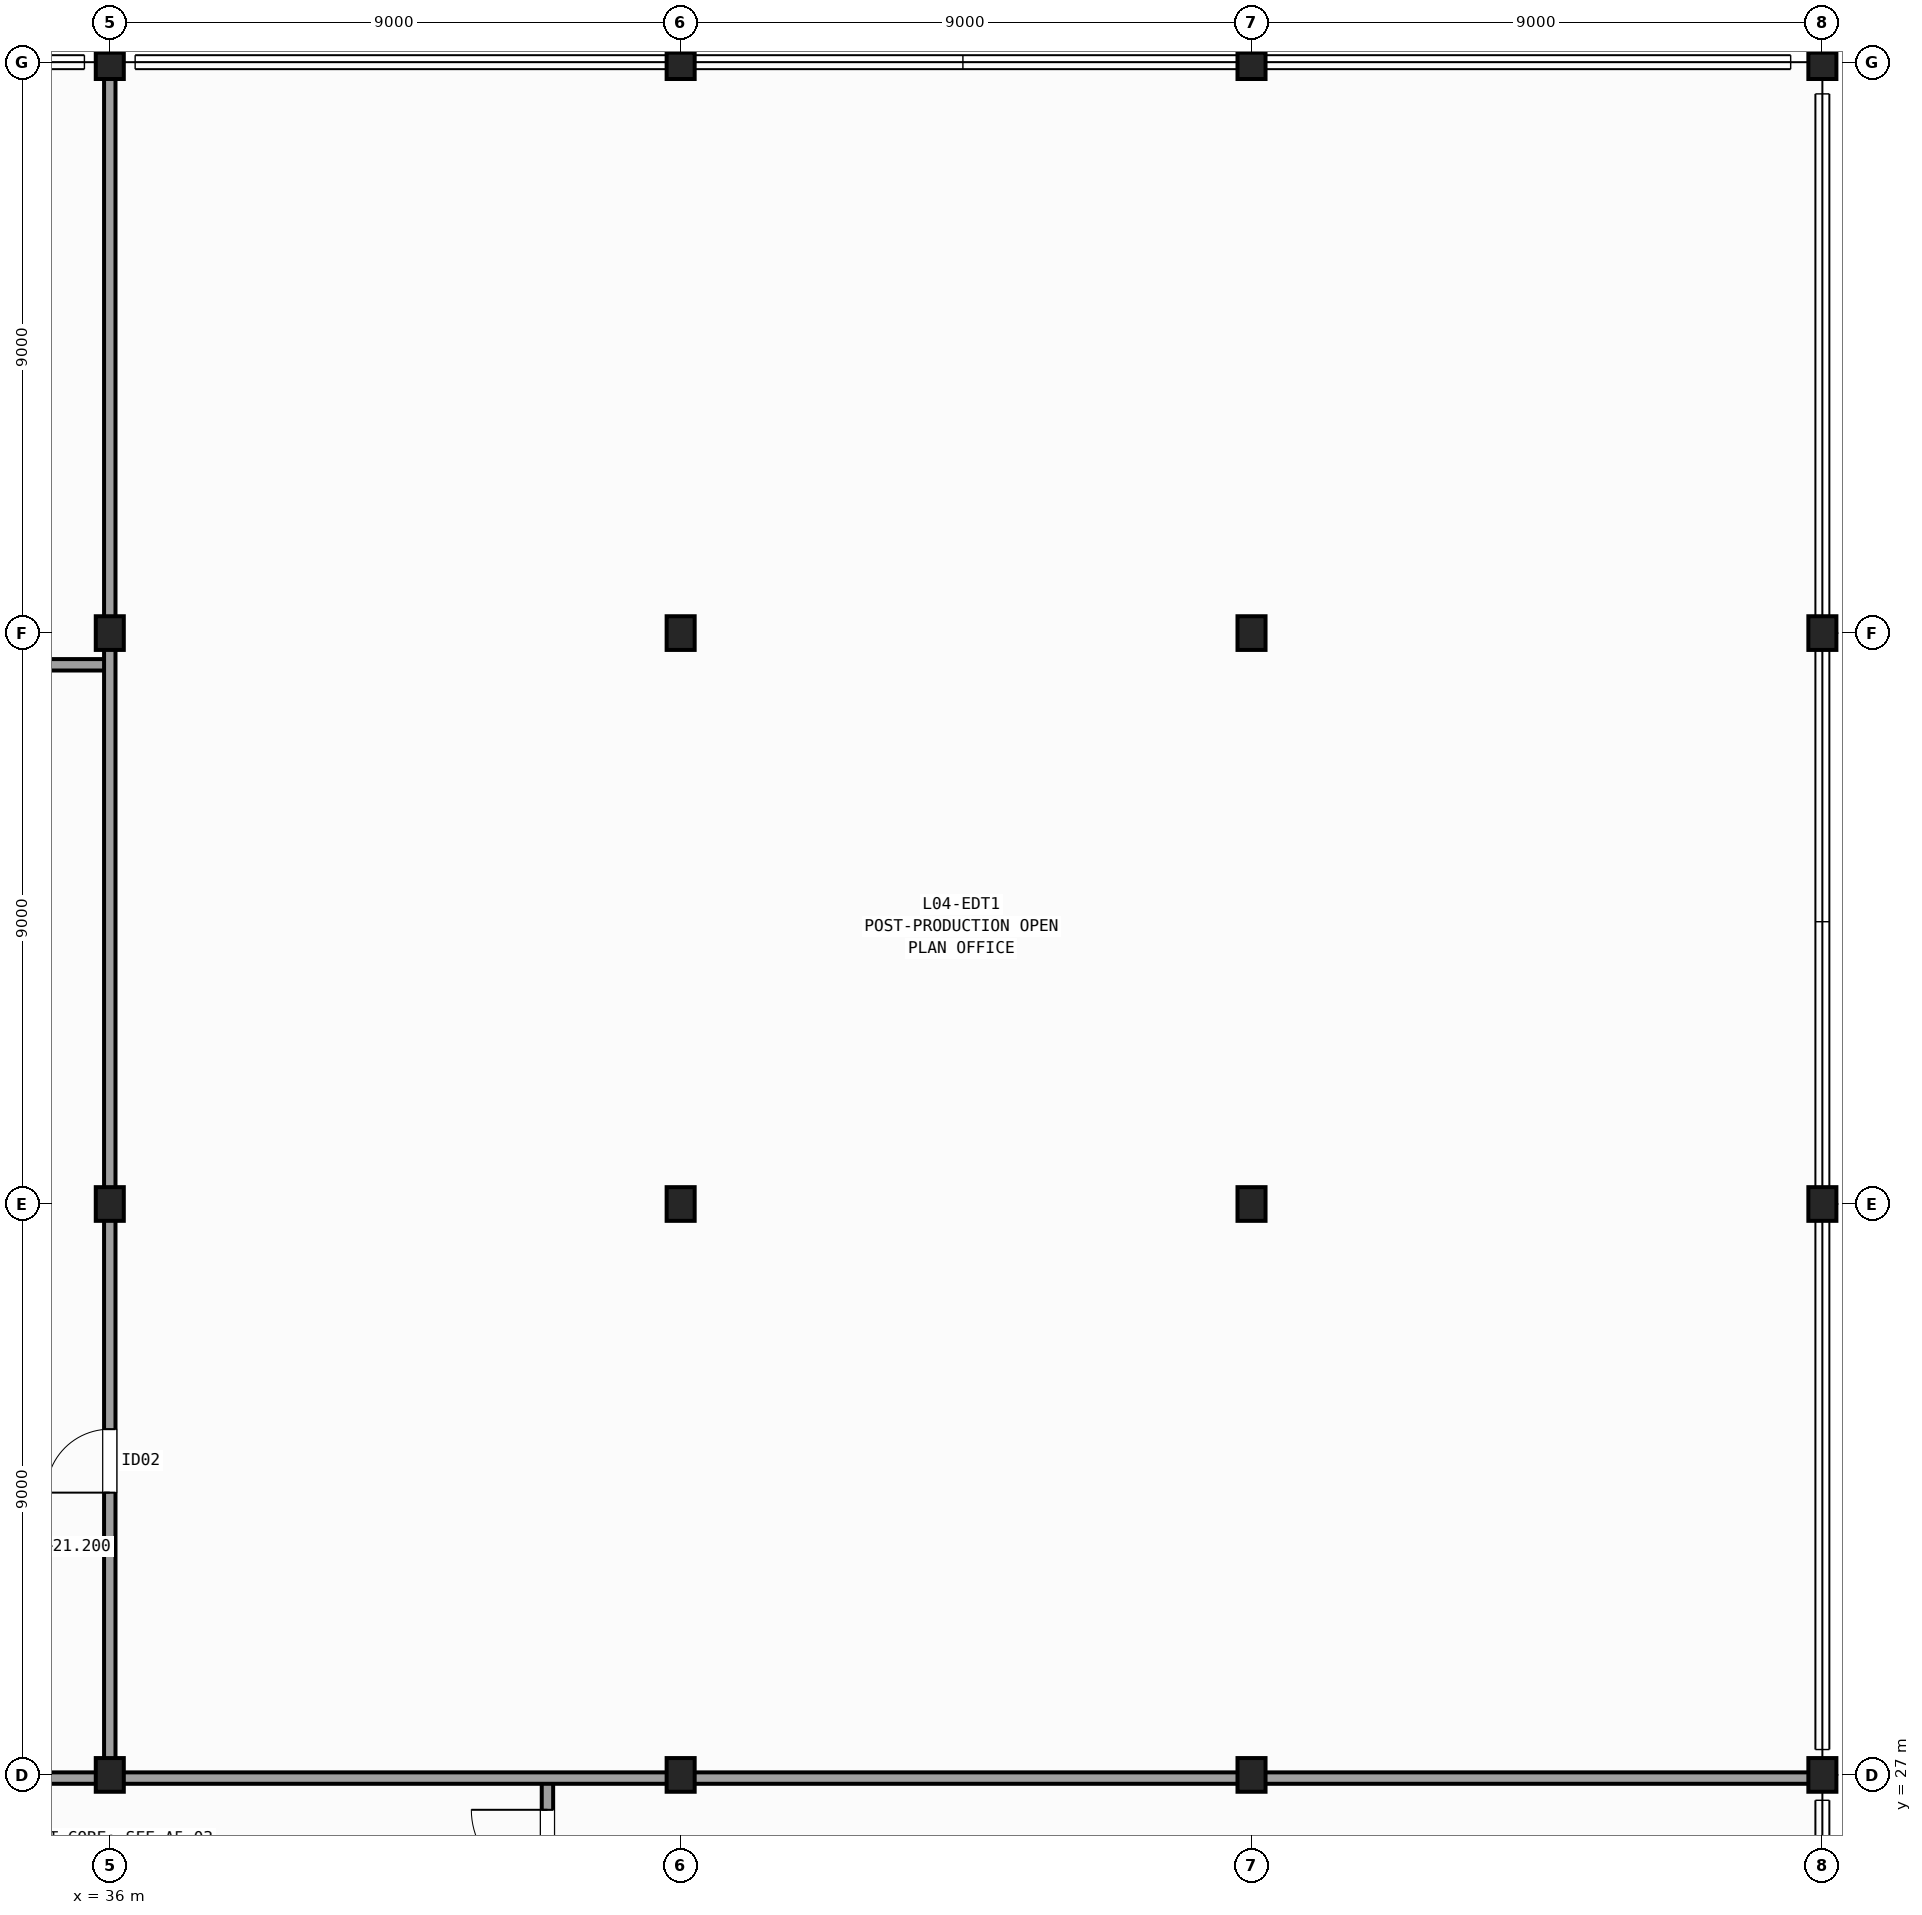
"""IFC4 building model, lengths in metres.
Left out: names, types, materials, properties, quantities, classifications, styles, units other than length and angle.
Written with IfcOpenShell. Run it as: python <this file> out.ifc"""

import sys

from ifc_helpers import new_model, si_unit, direction, frame, frame_2d, origin, origin_2d, place, context, subcontext, project, spatial, rectangle, i_section, extrude, element, fill, save


model = new_model("IFC4")
c1 = context("Model", 3, precision=1e-05, world=origin(), true_north=direction((0.0, 1.0)))
c2 = subcontext(c1, "Body", "Model", "MODEL_VIEW")
j1 = project(units=[si_unit("LENGTHUNIT", "METRE"), si_unit("PLANEANGLEUNIT", "RADIAN")], contexts=[c1])
p1 = place(None, origin())
s1 = spatial("IfcSite", under=j1, at=p1, CompositionType="ELEMENT")
p2 = place(p1, origin())
s2 = spatial("IfcBuilding", under=s1, at=p2, CompositionType="ELEMENT")
p3 = place(p2, frame((0.0, 0.0, 21.2)))
s3 = spatial("IfcBuildingStorey", under=s2, at=p3, CompositionType="ELEMENT", Elevation=21.2)
for number, where, z_axis, x_axis in (
    (1, (36.0, 27.0, 0.0), (0.0, 0.0, 1.0), (1.0, 0.0, 0.0)),
    (2, (36.0, 36.0, 0.0), (0.0, 0.0, 1.0), (1.0, 0.0, 0.0)),
    (3, (36.0, 45.0, 0.0), (0.0, 0.0, 1.0), (1.0, 0.0, 0.0)),
    (4, (36.0, 54.0, 0.0), (0.0, 0.0, 1.0), (1.0, 0.0, 0.0)),
    (5, (45.0, 27.0, 0.0), (0.0, 0.0, 1.0), (1.0, 0.0, 0.0)),
    (6, (45.0, 36.0, 0.0), (0.0, 0.0, 1.0), (1.0, 0.0, 0.0)),
    (7, (45.0, 45.0, 0.0), (0.0, 0.0, 1.0), (1.0, 0.0, 0.0)),
    (8, (45.0, 54.0, 0.0), (0.0, 0.0, 1.0), (1.0, 0.0, 0.0)),
    (9, (54.0, 27.0, 0.0), (0.0, 0.0, 1.0), (1.0, 0.0, 0.0)),
    (10, (54.0, 36.0, 0.0), (0.0, 0.0, 1.0), (1.0, 0.0, 0.0)),
    (11, (54.0, 45.0, 0.0), (0.0, 0.0, 1.0), (1.0, 0.0, 0.0)),
    (12, (54.0, 54.0, 0.0), (0.0, 0.0, 1.0), (1.0, 0.0, 0.0)),
    (13, (63.0, 27.0, 0.0), (0.0, 0.0, 1.0), (1.0, 0.0, 0.0)),
    (14, (63.0, 36.0, 0.0), (0.0, 0.0, 1.0), (1.0, 0.0, 0.0)),
    (15, (63.0, 45.0, 0.0), (0.0, 0.0, 1.0), (1.0, 0.0, 0.0)),
    (16, (63.0, 54.0, 0.0), (0.0, 0.0, 1.0), (1.0, 0.0, 0.0)),
):
    element("IfcColumn", number, at=place(p3, frame(where, z_axis=z_axis, x_axis=x_axis)), inside=s3, PredefinedType="COLUMN", context=c2, shape_type="SweptSolid", body=[
        extrude(i_section(OverallWidth=0.442, OverallDepth=0.531, WebThickness=0.066, FlangeThickness=0.106, FilletRadius=0.015, at=origin_2d()), origin(), (0.0, 0.0, 1.0), 4.8),
    ])
p4 = place(p3, frame((42.9, 24.6, 0.0), z_axis=(0.0, 0.0, 1.0), x_axis=(0.0, 1.0, 0.0)))
e17 = element("IfcWall", 17, at=p4, inside=s3, PredefinedType="PARTITIONING", context=c2, shape_type="SweptSolid", body=[
    extrude(rectangle(XDim=2.35, YDim=0.18, at=frame_2d((1.175, 0.0))), origin(), (0.0, 0.0, 1.0), 3.533),
])
p5 = place(p4, frame((0.65, 0.0, 0.0)))
e18 = element("IfcOpeningElement", 18, at=p5, cuts=e17, PredefinedType="OPENING", context=c2, shape_type="SweptSolid", body=[
    extrude(rectangle(XDim=1.2, YDim=2.15, at=frame_2d((0.6, 1.075))), frame((0.0, 0.1, 0.0), z_axis=(0.0, -1.0, 0.0), x_axis=(1.0, 0.0, 0.0)), (0.0, 0.0, 1.0), 0.2),
])
p6 = place(p3, frame((27.1, 26.95, 0.0), z_axis=(0.0, 0.0, 1.0), x_axis=(1.0, 0.0, 0.0)))
e19 = element("IfcWall", 19, at=p6, inside=s3, PredefinedType="PARTITIONING", context=c2, shape_type="SweptSolid", body=[
    extrude(rectangle(XDim=35.9, YDim=0.18, at=frame_2d((17.95, 0.0))), origin(), (0.0, 0.0, 1.0), 3.533),
])
p7 = place(p3, frame((11.1, 44.5, 0.0), z_axis=(0.0, 0.0, 1.0), x_axis=(1.0, 0.0, 0.0)))
e20 = element("IfcWall", 20, at=p7, inside=s3, PredefinedType="PARTITIONING", context=c2, shape_type="SweptSolid", body=[
    extrude(rectangle(XDim=24.9, YDim=0.18, at=frame_2d((12.45, 0.0))), origin(), (0.0, 0.0, 1.0), 3.605),
])
p8 = place(p7, frame((4.5, 0.0, 0.0)))
e21 = element("IfcOpeningElement", 21, at=p8, cuts=e20, PredefinedType="OPENING", context=c2, shape_type="SweptSolid", body=[
    extrude(rectangle(XDim=0.95, YDim=2.1, at=frame_2d((0.475, 1.05))), frame((0.0, 0.1, 0.0), z_axis=(0.0, -1.0, 0.0), x_axis=(1.0, 0.0, 0.0)), (0.0, 0.0, 1.0), 0.2),
])
p9 = place(p3, frame((36.0, 26.95, 0.0), z_axis=(0.0, 0.0, 1.0), x_axis=(0.0, 1.0, 0.0)))
e22 = element("IfcWall", 22, at=p9, inside=s3, PredefinedType="PARTITIONING", context=c2, shape_type="SweptSolid", body=[
    extrude(rectangle(XDim=27.05, YDim=0.18, at=frame_2d((13.525, 0.0))), origin(), (0.0, 0.0, 1.0), 3.533),
])
p10 = place(p9, frame((4.5, 0.0, 0.0)))
e23 = element("IfcOpeningElement", 23, at=p10, cuts=e22, PredefinedType="OPENING", context=c2, shape_type="SweptSolid", body=[
    extrude(rectangle(XDim=1.0, YDim=2.1, at=frame_2d((0.5, 1.05))), frame((0.0, 0.1, 0.0), z_axis=(0.0, -1.0, 0.0), x_axis=(1.0, 0.0, 0.0)), (0.0, 0.0, 1.0), 0.2),
])
p11 = place(p5, origin())
e24 = element("IfcDoor", 24, at=p11, inside=s3, OperationType="SINGLE_SWING_RIGHT", PredefinedType="DOOR", context=c2, shape_type="SweptSolid", body=[
    extrude(rectangle(XDim=1.2, YDim=2.15, at=frame_2d((0.6, 1.075))), frame((0.0, 0.025, 0.0), z_axis=(0.0, -1.0, 0.0), x_axis=(1.0, 0.0, 0.0)), (0.0, 0.0, 1.0), 0.05),
])
fill(e18, e24)
p12 = place(p10, origin())
e25 = element("IfcDoor", 25, at=p12, inside=s3, OperationType="SINGLE_SWING_LEFT", PredefinedType="DOOR", context=c2, shape_type="SweptSolid", body=[
    extrude(rectangle(XDim=1.0, YDim=2.1, at=frame_2d((0.5, 1.05))), frame((0.0, 0.025, 0.0), z_axis=(0.0, -1.0, 0.0), x_axis=(1.0, 0.0, 0.0)), (0.0, 0.0, 1.0), 0.05),
])
fill(e23, e25)
save(model, sys.argv[1])
